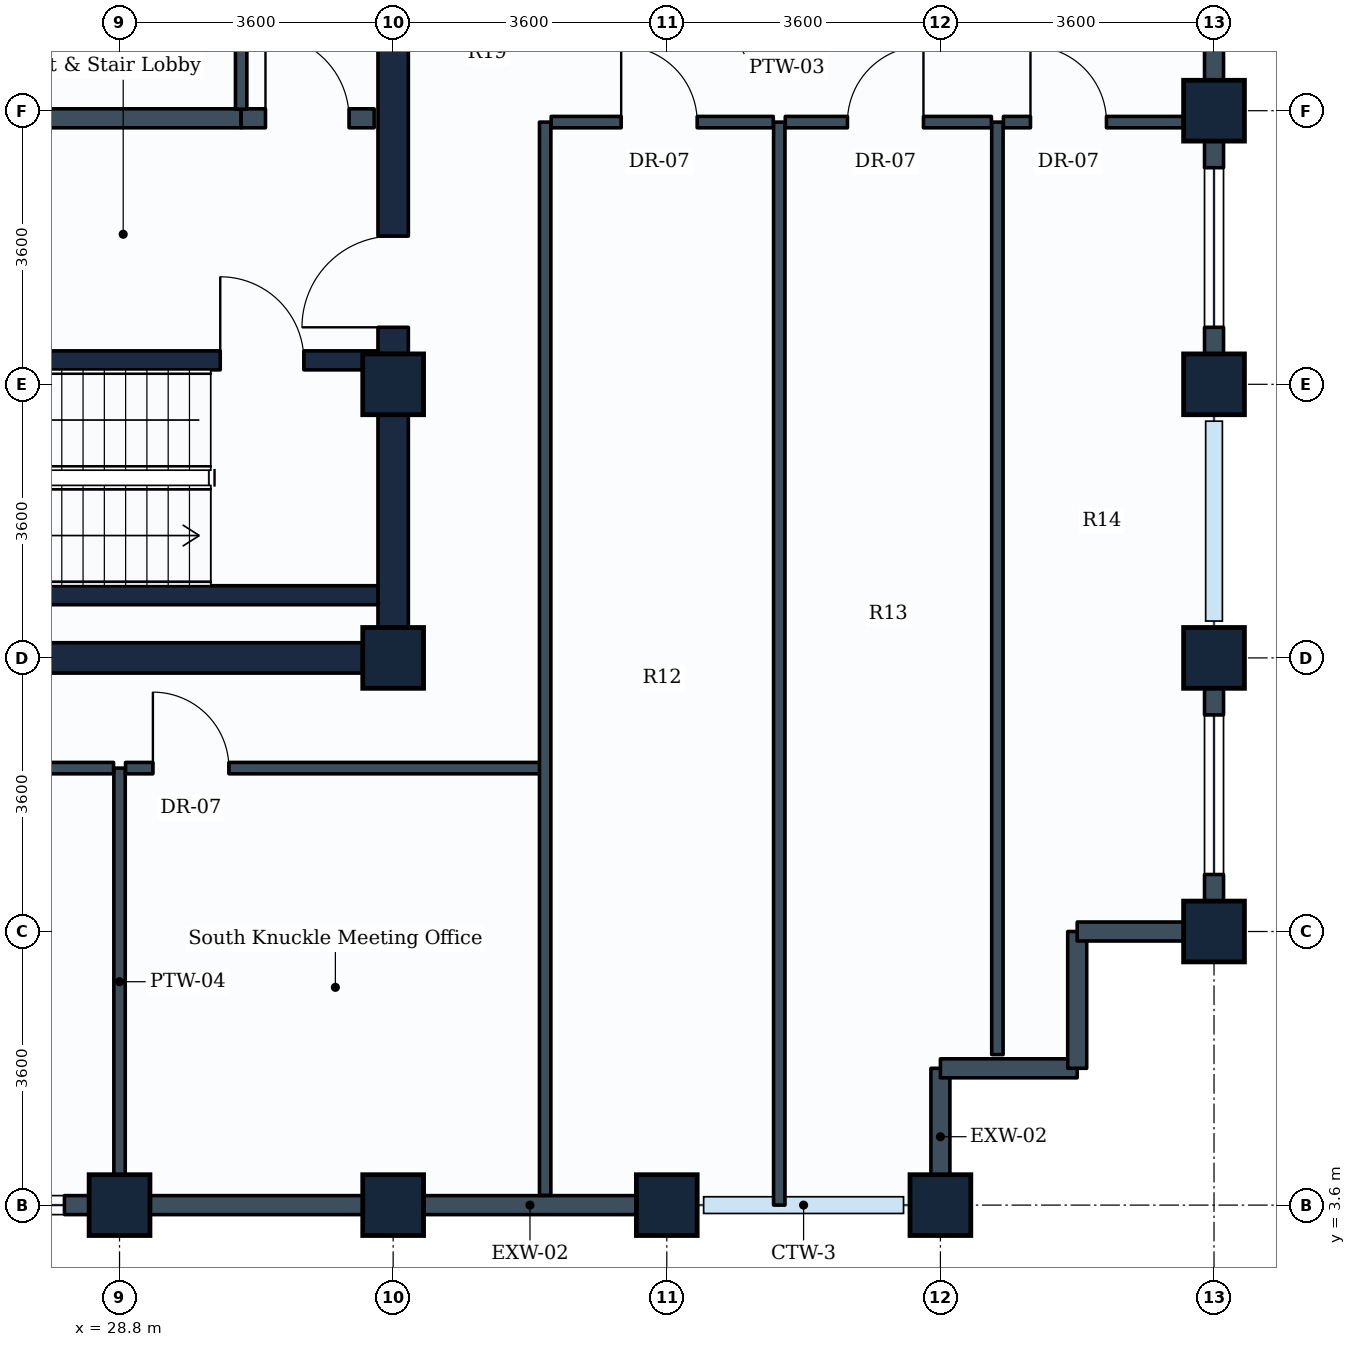
"""IFC4 building model, lengths in metres.
Left out: names, types, materials, properties, quantities, classifications, styles, units other than length and angle.
Written with IfcOpenShell. Run it as: python <this file> out.ifc"""

import sys

from ifc_helpers import new_model, si_unit, direction, frame, frame_2d, origin, origin_2d, place, context, subcontext, project, spatial, rectangle, extrude, element, fill, save


model = new_model("IFC4")
c1 = context("Model", 3, precision=1e-05, world=origin(), true_north=direction((0.0, 1.0)))
c2 = subcontext(c1, "Body", "Model", "MODEL_VIEW")
j1 = project(units=[si_unit("LENGTHUNIT", "METRE"), si_unit("PLANEANGLEUNIT", "RADIAN")], contexts=[c1])
p1 = place(None, origin())
s1 = spatial("IfcSite", under=j1, at=p1, CompositionType="ELEMENT")
p2 = place(p1, origin())
s2 = spatial("IfcBuilding", under=s1, at=p2, CompositionType="ELEMENT")
p3 = place(p2, frame((0.0, 0.0, 291.8)))
s3 = spatial("IfcBuildingStorey", under=s2, at=p3, CompositionType="ELEMENT", Elevation=291.8)
for number, where, z_axis, x_axis in (
    (1, (28.8, 3.6, 0.0), (0.0, 0.0, 1.0), (1.0, 0.0, 0.0)),
    (2, (32.4, 3.6, 0.0), (0.0, 0.0, 1.0), (1.0, 0.0, 0.0)),
    (3, (32.4, 10.8, 0.0), (0.0, 0.0, 1.0), (1.0, 0.0, 0.0)),
    (4, (32.4, 14.4, 0.0), (0.0, 0.0, 1.0), (1.0, 0.0, 0.0)),
    (5, (36.0, 3.6, 0.0), (0.0, 0.0, 1.0), (1.0, 0.0, 0.0)),
    (6, (39.6, 3.6, 0.0), (0.0, 0.0, 1.0), (1.0, 0.0, 0.0)),
    (7, (43.2, 7.2, 0.0), (0.0, 0.0, 1.0), (1.0, 0.0, 0.0)),
    (8, (43.2, 10.8, 0.0), (0.0, 0.0, 1.0), (0.0, 1.0, 0.0)),
    (9, (43.2, 14.4, 0.0), (0.0, 0.0, 1.0), (0.0, 1.0, 0.0)),
    (10, (43.2, 18.0, 0.0), (0.0, 0.0, 1.0), (0.0, 1.0, 0.0)),
):
    element("IfcColumn", number, at=place(p3, frame(where, z_axis=z_axis, x_axis=x_axis)), inside=s3, PredefinedType="COLUMN", context=c2, shape_type="SweptSolid", body=[
        extrude(rectangle(XDim=0.8, YDim=0.8, at=origin_2d()), origin(), (0.0, 0.0, 1.0), 3.6),
    ])
p4 = place(p3, frame((28.8, 3.6, 0.0), z_axis=(0.0, 0.0, 1.0), x_axis=(-1.0, 0.0, 0.0)))
e11 = element("IfcWall", 11, at=p4, inside=s3, PredefinedType="STANDARD", context=c2, shape_type="SweptSolid", body=[
    extrude(rectangle(XDim=3.6, YDim=0.25, at=frame_2d((1.8, 0.0))), origin(), (0.0, 0.0, 1.0), 2.83),
])
p5 = place(p4, frame((0.725, 0.0, 0.85)))
e12 = element("IfcOpeningElement", 12, at=p5, cuts=e11, PredefinedType="OPENING", context=c2, shape_type="SweptSolid", body=[
    extrude(rectangle(XDim=2.1, YDim=1.35, at=frame_2d((1.05, 0.675))), frame((0.0, 0.135, 0.0), z_axis=(0.0, -1.0, 0.0), x_axis=(1.0, 0.0, 0.0)), (0.0, 0.0, 1.0), 0.27),
])
p6 = place(p3, frame((32.4, 3.6, 0.0), z_axis=(0.0, 0.0, 1.0), x_axis=(-1.0, 0.0, 0.0)))
e13 = element("IfcWall", 13, at=p6, inside=s3, PredefinedType="STANDARD", context=c2, shape_type="SweptSolid", body=[
    extrude(rectangle(XDim=3.6, YDim=0.25, at=frame_2d((1.8, 0.0))), origin(), (0.0, 0.0, 1.0), 2.83),
])
p7 = place(p3, frame((36.0, 3.6, 0.0), z_axis=(0.0, 0.0, 1.0), x_axis=(-1.0, 0.0, 0.0)))
e14 = element("IfcWall", 14, at=p7, inside=s3, PredefinedType="STANDARD", context=c2, shape_type="SweptSolid", body=[
    extrude(rectangle(XDim=3.6, YDim=0.25, at=frame_2d((1.8, 0.0))), origin(), (0.0, 0.0, 1.0), 2.83),
])
p8 = place(p3, frame((39.6, 5.4, 0.0), z_axis=(0.0, 0.0, 1.0), x_axis=(0.0, -1.0, 0.0)))
e15 = element("IfcWall", 15, at=p8, inside=s3, PredefinedType="STANDARD", context=c2, shape_type="SweptSolid", body=[
    extrude(rectangle(XDim=1.8, YDim=0.25, at=frame_2d((0.9, 0.0))), origin(), (0.0, 0.0, 1.0), 2.83),
])
p9 = place(p3, frame((41.4, 5.4, 0.0), z_axis=(0.0, 0.0, 1.0), x_axis=(-1.0, 0.0, 0.0)))
e16 = element("IfcWall", 16, at=p9, inside=s3, PredefinedType="STANDARD", context=c2, shape_type="SweptSolid", body=[
    extrude(rectangle(XDim=1.8, YDim=0.25, at=frame_2d((0.9, 0.0))), origin(), (0.0, 0.0, 1.0), 3.335),
])
p10 = place(p3, frame((41.4, 7.2, 0.0), z_axis=(0.0, 0.0, 1.0), x_axis=(0.0, -1.0, 0.0)))
e17 = element("IfcWall", 17, at=p10, inside=s3, PredefinedType="STANDARD", context=c2, shape_type="SweptSolid", body=[
    extrude(rectangle(XDim=1.8, YDim=0.25, at=frame_2d((0.9, 0.0))), origin(), (0.0, 0.0, 1.0), 3.335),
])
p11 = place(p3, frame((43.2, 7.2, 0.0), z_axis=(0.0, 0.0, 1.0), x_axis=(-1.0, 0.0, 0.0)))
e18 = element("IfcWall", 18, at=p11, inside=s3, PredefinedType="STANDARD", context=c2, shape_type="SweptSolid", body=[
    extrude(rectangle(XDim=1.8, YDim=0.25, at=frame_2d((0.9, 0.0))), origin(), (0.0, 0.0, 1.0), 2.83),
])
p12 = place(p3, frame((43.2, 10.8, 0.0), z_axis=(0.0, 0.0, 1.0), x_axis=(0.0, -1.0, 0.0)))
e19 = element("IfcWall", 19, at=p12, inside=s3, PredefinedType="STANDARD", context=c2, shape_type="SweptSolid", body=[
    extrude(rectangle(XDim=3.6, YDim=0.25, at=frame_2d((1.8, 0.0))), origin(), (0.0, 0.0, 1.0), 2.83),
])
p13 = place(p12, frame((0.75, 0.0, 0.85)))
e20 = element("IfcOpeningElement", 20, at=p13, cuts=e19, PredefinedType="OPENING", context=c2, shape_type="SweptSolid", body=[
    extrude(rectangle(XDim=2.1, YDim=1.35, at=frame_2d((1.05, 0.675))), frame((0.0, 0.135, 0.0), z_axis=(0.0, -1.0, 0.0), x_axis=(1.0, 0.0, 0.0)), (0.0, 0.0, 1.0), 0.27),
])
p14 = place(p3, frame((43.2, 18.0, 0.0), z_axis=(0.0, 0.0, 1.0), x_axis=(0.0, -1.0, 0.0)))
e21 = element("IfcWall", 21, at=p14, inside=s3, PredefinedType="STANDARD", context=c2, shape_type="SweptSolid", body=[
    extrude(rectangle(XDim=3.6, YDim=0.25, at=frame_2d((1.8, 0.0))), origin(), (0.0, 0.0, 1.0), 2.83),
])
p15 = place(p14, frame((0.75, 0.0, 0.85)))
e22 = element("IfcOpeningElement", 22, at=p15, cuts=e21, PredefinedType="OPENING", context=c2, shape_type="SweptSolid", body=[
    extrude(rectangle(XDim=2.1, YDim=1.35, at=frame_2d((1.05, 0.675))), frame((0.0, 0.135, 0.0), z_axis=(0.0, -1.0, 0.0), x_axis=(1.0, 0.0, 0.0)), (0.0, 0.0, 1.0), 0.27),
])
p16 = place(p3, frame((43.2, 21.6, 0.0), z_axis=(0.0, 0.0, 1.0), x_axis=(0.0, -1.0, 0.0)))
e23 = element("IfcWall", 23, at=p16, inside=s3, PredefinedType="STANDARD", context=c2, shape_type="SweptSolid", body=[
    extrude(rectangle(XDim=3.6, YDim=0.25, at=frame_2d((1.8, 0.0))), origin(), (0.0, 0.0, 1.0), 2.83),
])
p17 = place(p3, frame((14.4, 10.8, 0.0), z_axis=(0.0, 0.0, 1.0), x_axis=(1.0, 0.0, 0.0)))
e24 = element("IfcWall", 24, at=p17, inside=s3, PredefinedType="SHEAR", context=c2, shape_type="SweptSolid", body=[
    extrude(rectangle(XDim=18.0, YDim=0.4, at=frame_2d((9.0, 0.0))), origin(), (0.0, 0.0, 1.0), 3.35),
])
p18 = place(p3, frame((32.4, 10.8, 0.0), z_axis=(0.0, 0.0, 1.0), x_axis=(0.0, 1.0, 0.0)))
e25 = element("IfcWall", 25, at=p18, inside=s3, PredefinedType="SHEAR", context=c2, shape_type="SweptSolid", body=[
    extrude(rectangle(XDim=14.4, YDim=0.4, at=frame_2d((7.2, 0.0))), origin(), (0.0, 0.0, 1.0), 3.35),
])
p19 = place(p18, frame((4.35, 0.0, 0.0)))
e26 = element("IfcOpeningElement", 26, at=p19, cuts=e25, PredefinedType="OPENING", context=c2, shape_type="SweptSolid", body=[
    extrude(rectangle(XDim=1.2, YDim=2.1, at=frame_2d((0.6, 1.05))), frame((0.0, 0.21, 0.0), z_axis=(0.0, -1.0, 0.0), x_axis=(1.0, 0.0, 0.0)), (0.0, 0.0, 1.0), 0.42),
])
p20 = place(p18, frame((10.0, 0.0, 0.0)))
e27 = element("IfcOpeningElement", 27, at=p20, cuts=e25, PredefinedType="OPENING", context=c2, shape_type="SweptSolid", body=[
    extrude(rectangle(XDim=1.2, YDim=2.1, at=frame_2d((0.6, 1.05))), frame((0.0, 0.21, 0.0), z_axis=(0.0, -1.0, 0.0), x_axis=(1.0, 0.0, 0.0)), (0.0, 0.0, 1.0), 0.42),
])
p21 = place(p3, frame((23.35, 11.625, 0.0), z_axis=(0.0, 0.0, 1.0), x_axis=(1.0, 0.0, 0.0)))
e28 = element("IfcWall", 28, at=p21, inside=s3, PredefinedType="SHEAR", context=c2, shape_type="SweptSolid", body=[
    extrude(rectangle(XDim=8.85, YDim=0.25, at=frame_2d((4.425, 0.0))), origin(), (0.0, 0.0, 1.0), 3.35),
])
p22 = place(p3, frame((23.35, 14.715, 0.0), z_axis=(0.0, 0.0, 1.0), x_axis=(1.0, 0.0, 0.0)))
e29 = element("IfcWall", 29, at=p22, inside=s3, PredefinedType="SHEAR", context=c2, shape_type="SweptSolid", body=[
    extrude(rectangle(XDim=8.85, YDim=0.25, at=frame_2d((4.425, 0.0))), origin(), (0.0, 0.0, 1.0), 3.35),
])
p23 = place(p22, frame((6.775, 0.0, 0.0)))
e30 = element("IfcOpeningElement", 30, at=p23, cuts=e29, PredefinedType="OPENING", context=c2, shape_type="SweptSolid", body=[
    extrude(rectangle(XDim=1.1, YDim=2.1, at=frame_2d((0.55, 1.05))), frame((0.0, 0.135, 0.0), z_axis=(0.0, -1.0, 0.0), x_axis=(1.0, 0.0, 0.0)), (0.0, 0.0, 1.0), 0.27),
])
p24 = place(p3, frame((21.88, 17.9, 0.0), z_axis=(0.0, 0.0, 1.0), x_axis=(1.0, 0.0, 0.0)))
e31 = element("IfcWall", 31, at=p24, inside=s3, PredefinedType="PARTITIONING", context=c2, shape_type="SweptSolid", body=[
    extrude(rectangle(XDim=8.52, YDim=0.25, at=frame_2d((4.26, 0.0))), origin(), (0.0, 0.0, 1.0), 3.335),
])
p25 = place(p3, frame((30.4, 17.9, 0.0), z_axis=(0.0, 0.0, 1.0), x_axis=(1.0, 0.0, 0.0)))
e32 = element("IfcWall", 32, at=p25, inside=s3, PredefinedType="PARTITIONING", context=c2, shape_type="SweptSolid", body=[
    extrude(rectangle(XDim=1.75, YDim=0.25, at=frame_2d((0.875, 0.0))), origin(), (0.0, 0.0, 1.0), 3.335),
])
p26 = place(p25, frame((0.32, 0.0, 0.0)))
e33 = element("IfcOpeningElement", 33, at=p26, cuts=e32, PredefinedType="OPENING", context=c2, shape_type="SweptSolid", body=[
    extrude(rectangle(XDim=1.1, YDim=2.1, at=frame_2d((0.55, 1.05))), frame((0.0, 0.135, 0.0), z_axis=(0.0, -1.0, 0.0), x_axis=(1.0, 0.0, 0.0)), (0.0, 0.0, 1.0), 0.27),
])
p27 = place(p3, frame((30.4, 18.02, 0.0), z_axis=(0.0, 0.0, 1.0), x_axis=(0.0, 1.0, 0.0)))
e34 = element("IfcWall", 34, at=p27, inside=s3, PredefinedType="PARTITIONING", context=c2, shape_type="SweptSolid", body=[
    extrude(rectangle(XDim=3.2, YDim=0.15, at=frame_2d((1.6, 0.0))), origin(), (0.0, 0.0, 1.0), 3.335),
])
p28 = place(p3, frame((28.8, 9.35, 0.0), z_axis=(0.0, 0.0, 1.0), x_axis=(0.0, -1.0, 0.0)))
e35 = element("IfcWall", 35, at=p28, inside=s3, PredefinedType="PARTITIONING", context=c2, shape_type="SweptSolid", body=[
    extrude(rectangle(XDim=5.621, YDim=0.15, at=frame_2d((2.811, 0.0))), origin(), (0.0, 0.0, 1.0), 3.335),
])
p29 = place(p3, frame((12.95, 9.35, 0.0), z_axis=(0.0, 0.0, 1.0), x_axis=(1.0, 0.0, 0.0)))
e36 = element("IfcWall", 36, at=p29, inside=s3, PredefinedType="PARTITIONING", context=c2, shape_type="SweptSolid", body=[
    extrude(rectangle(XDim=15.771, YDim=0.15, at=frame_2d((7.885, 0.0))), origin(), (0.0, 0.0, 1.0), 3.02),
])
p30 = place(p29, frame((4.836, 0.0, 0.0)))
e37 = element("IfcOpeningElement", 37, at=p30, cuts=e36, PredefinedType="OPENING", context=c2, shape_type="SweptSolid", body=[
    extrude(rectangle(XDim=1.0, YDim=2.1, at=frame_2d((0.5, 1.05))), frame((0.0, 0.085, 0.0), z_axis=(0.0, -1.0, 0.0), x_axis=(1.0, 0.0, 0.0)), (0.0, 0.0, 1.0), 0.17),
])
p31 = place(p3, frame((28.879, 9.35, 0.0), z_axis=(0.0, 0.0, 1.0), x_axis=(1.0, 0.0, 0.0)))
e38 = element("IfcWall", 38, at=p31, inside=s3, PredefinedType="PARTITIONING", context=c2, shape_type="SweptSolid", body=[
    extrude(rectangle(XDim=5.521, YDim=0.15, at=frame_2d((2.76, 0.0))), origin(), (0.0, 0.0, 1.0), 3.335),
])
p32 = place(p31, frame((0.36, 0.0, 0.0)))
e39 = element("IfcOpeningElement", 39, at=p32, cuts=e38, PredefinedType="OPENING", context=c2, shape_type="SweptSolid", body=[
    extrude(rectangle(XDim=1.0, YDim=2.1, at=frame_2d((0.5, 1.05))), frame((0.0, 0.085, 0.0), z_axis=(0.0, -1.0, 0.0), x_axis=(1.0, 0.0, 0.0)), (0.0, 0.0, 1.0), 0.17),
])
p33 = place(p3, frame((34.4, 3.729, 0.0), z_axis=(0.0, 0.0, 1.0), x_axis=(0.0, 1.0, 0.0)))
e40 = element("IfcWall", 40, at=p33, inside=s3, PredefinedType="PARTITIONING", context=c2, shape_type="SweptSolid", body=[
    extrude(rectangle(XDim=14.121, YDim=0.15, at=frame_2d((7.061, 0.0))), origin(), (0.0, 0.0, 1.0), 2.83),
])
p34 = place(p3, frame((37.48, 3.6, 0.0), z_axis=(0.0, 0.0, 1.0), x_axis=(0.0, 1.0, 0.0)))
e41 = element("IfcWall", 41, at=p34, inside=s3, PredefinedType="PARTITIONING", context=c2, shape_type="SweptSolid", body=[
    extrude(rectangle(XDim=14.25, YDim=0.15, at=frame_2d((7.125, 0.0))), origin(), (0.0, 0.0, 1.0), 2.83),
])
p35 = place(p3, frame((34.479, 17.85, 0.0), z_axis=(0.0, 0.0, 1.0), x_axis=(1.0, 0.0, 0.0)))
e42 = element("IfcWall", 42, at=p35, inside=s3, PredefinedType="PARTITIONING", context=c2, shape_type="SweptSolid", body=[
    extrude(rectangle(XDim=2.922, YDim=0.15, at=frame_2d((1.461, 0.0))), origin(), (0.0, 0.0, 1.0), 3.02),
])
p36 = place(p35, frame((0.921, 0.0, 0.0)))
e43 = element("IfcOpeningElement", 43, at=p36, cuts=e42, PredefinedType="OPENING", context=c2, shape_type="SweptSolid", body=[
    extrude(rectangle(XDim=1.0, YDim=2.1, at=frame_2d((0.5, 1.05))), frame((0.0, 0.085, 0.0), z_axis=(0.0, -1.0, 0.0), x_axis=(1.0, 0.0, 0.0)), (0.0, 0.0, 1.0), 0.17),
])
p37 = place(p3, frame((40.35, 5.58, 0.0), z_axis=(0.0, 0.0, 1.0), x_axis=(0.0, 1.0, 0.0)))
e44 = element("IfcWall", 44, at=p37, inside=s3, PredefinedType="PARTITIONING", context=c2, shape_type="SweptSolid", body=[
    extrude(rectangle(XDim=12.27, YDim=0.15, at=frame_2d((6.135, 0.0))), origin(), (0.0, 0.0, 1.0), 3.03),
])
p38 = place(p3, frame((37.559, 17.85, 0.0), z_axis=(0.0, 0.0, 1.0), x_axis=(1.0, 0.0, 0.0)))
e45 = element("IfcWall", 45, at=p38, inside=s3, PredefinedType="PARTITIONING", context=c2, shape_type="SweptSolid", body=[
    extrude(rectangle(XDim=2.712, YDim=0.15, at=frame_2d((1.356, 0.0))), origin(), (0.0, 0.0, 1.0), 3.335),
])
p39 = place(p38, frame((0.818, 0.0, 0.0)))
e46 = element("IfcOpeningElement", 46, at=p39, cuts=e45, PredefinedType="OPENING", context=c2, shape_type="SweptSolid", body=[
    extrude(rectangle(XDim=1.0, YDim=2.1, at=frame_2d((0.5, 1.05))), frame((0.0, 0.085, 0.0), z_axis=(0.0, -1.0, 0.0), x_axis=(1.0, 0.0, 0.0)), (0.0, 0.0, 1.0), 0.17),
])
p40 = place(p3, frame((40.429, 17.85, 0.0), z_axis=(0.0, 0.0, 1.0), x_axis=(1.0, 0.0, 0.0)))
e47 = element("IfcWall", 47, at=p40, inside=s3, PredefinedType="PARTITIONING", context=c2, shape_type="SweptSolid", body=[
    extrude(rectangle(XDim=2.642, YDim=0.15, at=frame_2d((1.321, 0.0))), origin(), (0.0, 0.0, 1.0), 2.83),
])
p41 = place(p40, frame((0.356, 0.0, 0.0)))
e48 = element("IfcOpeningElement", 48, at=p41, cuts=e47, PredefinedType="OPENING", context=c2, shape_type="SweptSolid", body=[
    extrude(rectangle(XDim=1.0, YDim=2.1, at=frame_2d((0.5, 1.05))), frame((0.0, 0.085, 0.0), z_axis=(0.0, -1.0, 0.0), x_axis=(1.0, 0.0, 0.0)), (0.0, 0.0, 1.0), 0.17),
])
p42 = place(p5, origin())
e49 = element("IfcWindow", 49, at=p42, inside=s3, PartitioningType="SINGLE_PANEL", PredefinedType="WINDOW", context=c2, shape_type="SweptSolid", body=[
    extrude(rectangle(XDim=2.1, YDim=1.35, at=frame_2d((1.05, 0.675))), frame((0.0, 0.03, 0.0), z_axis=(0.0, -1.0, 0.0), x_axis=(1.0, 0.0, 0.0)), (0.0, 0.0, 1.0), 0.06),
])
fill(e12, e49)
p43 = place(p13, origin())
e50 = element("IfcWindow", 50, at=p43, inside=s3, PartitioningType="SINGLE_PANEL", PredefinedType="WINDOW", context=c2, shape_type="SweptSolid", body=[
    extrude(rectangle(XDim=2.1, YDim=1.35, at=frame_2d((1.05, 0.675))), frame((0.0, 0.03, 0.0), z_axis=(0.0, -1.0, 0.0), x_axis=(1.0, 0.0, 0.0)), (0.0, 0.0, 1.0), 0.06),
])
fill(e20, e50)
p44 = place(p15, origin())
e51 = element("IfcWindow", 51, at=p44, inside=s3, PartitioningType="SINGLE_PANEL", PredefinedType="WINDOW", context=c2, shape_type="SweptSolid", body=[
    extrude(rectangle(XDim=2.1, YDim=1.35, at=frame_2d((1.05, 0.675))), frame((0.0, 0.03, 0.0), z_axis=(0.0, -1.0, 0.0), x_axis=(1.0, 0.0, 0.0)), (0.0, 0.0, 1.0), 0.06),
])
fill(e22, e51)
p45 = place(p23, origin())
e52 = element("IfcDoor", 52, at=p45, inside=s3, OperationType="SINGLE_SWING_LEFT", PredefinedType="DOOR", context=c2, shape_type="SweptSolid", body=[
    extrude(rectangle(XDim=1.1, YDim=2.1, at=frame_2d((0.55, 1.05))), frame((0.0, 0.025, 0.0), z_axis=(0.0, -1.0, 0.0), x_axis=(1.0, 0.0, 0.0)), (0.0, 0.0, 1.0), 0.05),
])
fill(e30, e52)
p46 = place(p19, origin())
e53 = element("IfcDoor", 53, at=p46, inside=s3, OperationType="SINGLE_SWING_LEFT", PredefinedType="DOOR", context=c2, shape_type="SweptSolid", body=[
    extrude(rectangle(XDim=1.2, YDim=2.1, at=frame_2d((0.6, 1.05))), frame((0.0, 0.025, 0.0), z_axis=(0.0, -1.0, 0.0), x_axis=(1.0, 0.0, 0.0)), (0.0, 0.0, 1.0), 0.05),
])
fill(e26, e53)
p47 = place(p26, origin())
e54 = element("IfcDoor", 54, at=p47, inside=s3, OperationType="SINGLE_SWING_LEFT", PredefinedType="DOOR", context=c2, shape_type="SweptSolid", body=[
    extrude(rectangle(XDim=1.1, YDim=2.1, at=frame_2d((0.55, 1.05))), frame((0.0, 0.025, 0.0), z_axis=(0.0, -1.0, 0.0), x_axis=(1.0, 0.0, 0.0)), (0.0, 0.0, 1.0), 0.05),
])
fill(e33, e54)
p48 = place(p32, origin())
e55 = element("IfcDoor", 55, at=p48, inside=s3, OperationType="SINGLE_SWING_LEFT", PredefinedType="DOOR", context=c2, shape_type="SweptSolid", body=[
    extrude(rectangle(XDim=1.0, YDim=2.1, at=frame_2d((0.5, 1.05))), frame((0.0, 0.025, 0.0), z_axis=(0.0, -1.0, 0.0), x_axis=(1.0, 0.0, 0.0)), (0.0, 0.0, 1.0), 0.05),
])
fill(e39, e55)
p49 = place(p36, origin())
e56 = element("IfcDoor", 56, at=p49, inside=s3, OperationType="SINGLE_SWING_LEFT", PredefinedType="DOOR", context=c2, shape_type="SweptSolid", body=[
    extrude(rectangle(XDim=1.0, YDim=2.1, at=frame_2d((0.5, 1.05))), frame((0.0, 0.025, 0.0), z_axis=(0.0, -1.0, 0.0), x_axis=(1.0, 0.0, 0.0)), (0.0, 0.0, 1.0), 0.05),
])
fill(e43, e56)
p50 = place(p39, origin())
e57 = element("IfcDoor", 57, at=p50, inside=s3, OperationType="SINGLE_SWING_RIGHT", PredefinedType="DOOR", context=c2, shape_type="SweptSolid", body=[
    extrude(rectangle(XDim=1.0, YDim=2.1, at=frame_2d((0.5, 1.05))), frame((0.0, 0.025, 0.0), z_axis=(0.0, -1.0, 0.0), x_axis=(1.0, 0.0, 0.0)), (0.0, 0.0, 1.0), 0.05),
])
fill(e46, e57)
p51 = place(p41, origin())
e58 = element("IfcDoor", 58, at=p51, inside=s3, OperationType="SINGLE_SWING_LEFT", PredefinedType="DOOR", context=c2, shape_type="SweptSolid", body=[
    extrude(rectangle(XDim=1.0, YDim=2.1, at=frame_2d((0.5, 1.05))), frame((0.0, 0.025, 0.0), z_axis=(0.0, -1.0, 0.0), x_axis=(1.0, 0.0, 0.0)), (0.0, 0.0, 1.0), 0.05),
])
fill(e48, e58)
save(model, sys.argv[1])
